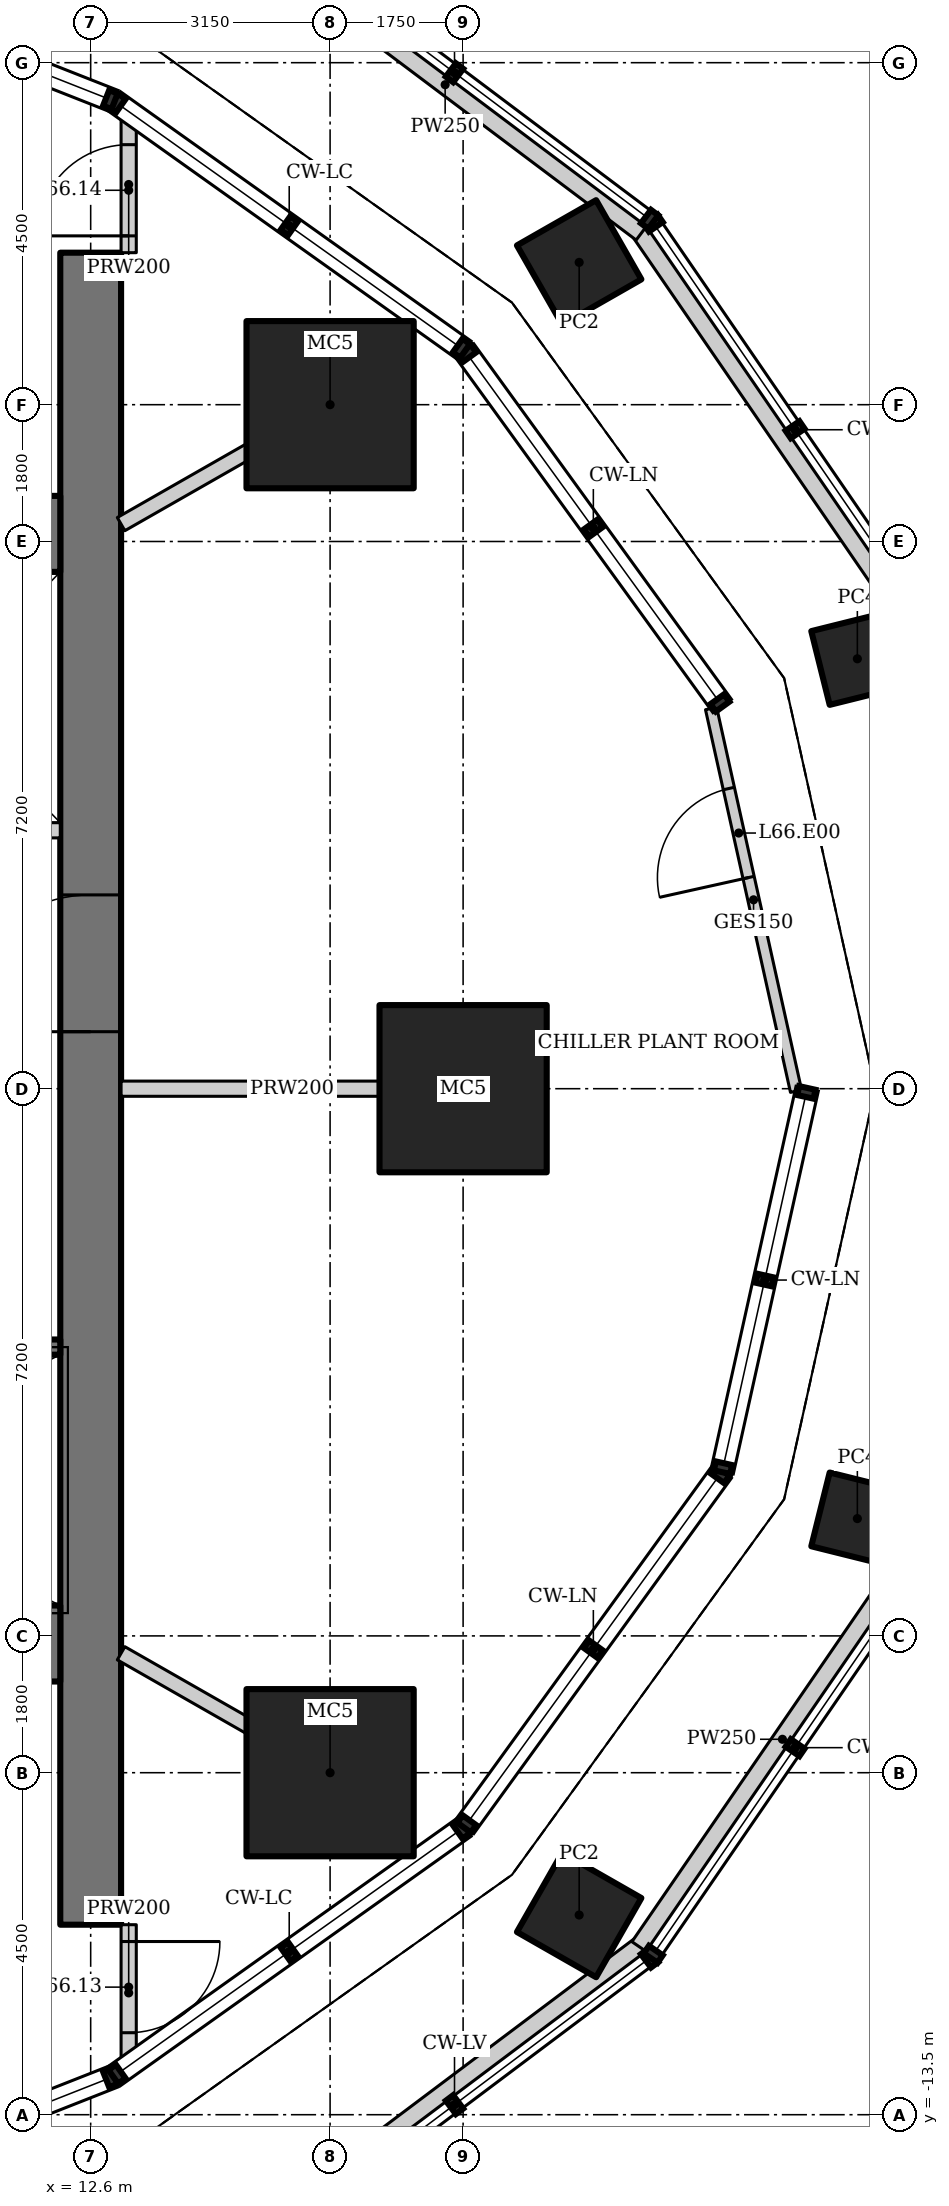
"""IFC4 building model, lengths in metres.
Left out: names, types, materials, properties, quantities, classifications, styles, units other than length and angle.
Written with IfcOpenShell. Run it as: python <this file> out.ifc"""

import sys

from ifc_helpers import new_model, si_unit, direction, frame, frame_2d, origin, origin_2d, place, context, subcontext, project, spatial, rectangle, hollow_rectangle, extrude, element, fill, save


model = new_model("IFC4")
c1 = context("Model", 3, precision=1e-05, world=origin(), true_north=direction((0.0, 1.0)))
c2 = subcontext(c1, "Body", "Model", "MODEL_VIEW")
j1 = project(units=[si_unit("LENGTHUNIT", "METRE"), si_unit("PLANEANGLEUNIT", "RADIAN")], contexts=[c1])
p1 = place(None, origin())
s1 = spatial("IfcSite", under=j1, at=p1, CompositionType="ELEMENT")
p2 = place(p1, origin())
s2 = spatial("IfcBuilding", under=s1, at=p2, CompositionType="ELEMENT")
p3 = place(p2, frame((0.0, 0.0, 284.4)))
s3 = spatial("IfcBuildingStorey", under=s2, at=p3, CompositionType="ELEMENT", Elevation=284.4)
for number, where, z_axis, x_axis in (
    (1, (17.5, 0.0, 0.0), (0.0, 0.0, 1.0), (1.0, 0.0, 0.0)),
    (2, (15.75, 9.0, 0.0), (0.0, 0.0, 1.0), (1.0, 0.0, 0.0)),
    (3, (15.75, -9.0, 0.0), (0.0, 0.0, 1.0), (1.0, 0.0, 0.0)),
):
    element("IfcColumn", number, at=place(p3, frame(where, z_axis=z_axis, x_axis=x_axis)), inside=s3, PredefinedType="COLUMN", context=c2, shape_type="SweptSolid", body=[
        extrude(hollow_rectangle(XDim=2.2, YDim=2.2, WallThickness=0.12, at=origin_2d()), origin(), (0.0, 0.0, 1.0), 5.8),
    ])
p4 = place(p3, frame((22.687, 5.656, 0.0), z_axis=(0.0, 0.0, 1.0), x_axis=(0.970295726276, 0.2419218956, 0.0)))
e4 = element("IfcColumn", 4, at=p4, inside=s3, PredefinedType="COLUMN", context=c2, shape_type="SweptSolid", body=[
    extrude(hollow_rectangle(XDim=1.0, YDim=1.0, WallThickness=0.08, at=origin_2d()), origin(), (0.0, 0.0, 1.0), 6.0),
])
for number, where, z_axis, x_axis in (
    (5, (19.027, 10.873, 0.0), (0.0, 0.0, 1.0), (0.868, 0.496, 0.0)),
    (6, (19.027, -10.873, 0.0), (0.0, 0.0, 1.0), (0.496, 0.868, 0.0)),
):
    element("IfcColumn", number, at=place(p3, frame(where, z_axis=z_axis, x_axis=x_axis)), inside=s3, PredefinedType="COLUMN", context=c2, shape_type="SweptSolid", body=[
        extrude(hollow_rectangle(XDim=1.2, YDim=1.2, WallThickness=0.1, at=origin_2d()), origin(), (0.0, 0.0, 1.0), 6.0),
    ])
p5 = place(p3, frame((22.687, -5.656, 0.0), z_axis=(0.0, 0.0, 1.0), x_axis=(0.2419218956, 0.970295726276, 0.0)))
e7 = element("IfcColumn", 7, at=p5, inside=s3, PredefinedType="COLUMN", context=c2, shape_type="SweptSolid", body=[
    extrude(hollow_rectangle(XDim=1.0, YDim=1.0, WallThickness=0.08, at=origin_2d()), origin(), (0.0, 0.0, 1.0), 6.0),
])
p6 = place(p3, frame((12.6, -11.0, 0.0), z_axis=(0.0, 0.0, 1.0), x_axis=(0.0, 1.0, 0.0)))
e8 = element("IfcWall", 8, at=p6, inside=s3, PredefinedType="SHEAR", context=c2, shape_type="SweptSolid", body=[
    extrude(rectangle(XDim=22.0, YDim=0.8, at=frame_2d((11.0, 0.0))), origin(), (0.0, 0.0, 1.0), 6.0),
])
p7 = place(p6, frame((11.75, 0.0, 0.0)))
e9 = element("IfcOpeningElement", 9, at=p7, cuts=e8, PredefinedType="OPENING", context=c2, shape_type="SweptSolid", body=[
    extrude(rectangle(XDim=1.8, YDim=2.1, at=frame_2d((0.9, 1.05))), frame((0.0, 0.41, 0.0), z_axis=(0.0, -1.0, 0.0), x_axis=(1.0, 0.0, 0.0)), (0.0, 0.0, 1.0), 0.82),
])
p8 = place(p3, frame((-12.2, -7.3, 0.0), z_axis=(0.0, 0.0, 1.0), x_axis=(1.0, 0.0, 0.0)))
e10 = element("IfcWall", 10, at=p8, inside=s3, PredefinedType="SHEAR", context=c2, shape_type="SweptSolid", body=[
    extrude(rectangle(XDim=24.4, YDim=1.0, at=frame_2d((12.2, 0.0))), origin(), (0.0, 0.0, 1.0), 6.0),
])
p9 = place(p3, frame((12.2, 7.3, 0.0), z_axis=(0.0, 0.0, 1.0), x_axis=(-1.0, 0.0, 0.0)))
e11 = element("IfcWall", 11, at=p9, inside=s3, PredefinedType="SHEAR", context=c2, shape_type="SweptSolid", body=[
    extrude(rectangle(XDim=6.6, YDim=1.0, at=frame_2d((3.3, 0.0))), origin(), (0.0, 0.0, 1.0), 6.0),
])
p10 = place(p3, frame((5.6, -3.4, 0.0), z_axis=(0.0, 0.0, 1.0), x_axis=(1.0, 0.0, 0.0)))
e12 = element("IfcWall", 12, at=p10, inside=s3, PredefinedType="SHEAR", context=c2, shape_type="SweptSolid", body=[
    extrude(rectangle(XDim=6.6, YDim=0.2, at=frame_2d((3.3, 0.0))), origin(), (0.0, 0.0, 1.0), 6.0),
])
p11 = place(p10, frame((5.2, 0.0, 0.0)))
e13 = element("IfcOpeningElement", 13, at=p11, cuts=e12, PredefinedType="OPENING", context=c2, shape_type="SweptSolid", body=[
    extrude(rectangle(XDim=1.2, YDim=2.1, at=frame_2d((0.6, 1.05))), frame((0.0, 0.11, 0.0), z_axis=(0.0, -1.0, 0.0), x_axis=(1.0, 0.0, 0.0)), (0.0, 0.0, 1.0), 0.22),
])
p12 = place(p3, frame((12.2, 3.4, 0.0), z_axis=(0.0, 0.0, 1.0), x_axis=(-1.0, 0.0, 0.0)))
e14 = element("IfcWall", 14, at=p12, inside=s3, PredefinedType="SOLIDWALL", context=c2, shape_type="SweptSolid", body=[
    extrude(rectangle(XDim=6.6, YDim=0.2, at=frame_2d((3.3, 0.0))), origin(), (0.0, 0.0, 1.0), 6.0),
])
p13 = place(p12, frame((4.45, 0.0, 0.0)))
e15 = element("IfcOpeningElement", 15, at=p13, cuts=e14, PredefinedType="OPENING", context=c2, shape_type="SweptSolid", body=[
    extrude(rectangle(XDim=1.1, YDim=2.2, at=frame_2d((0.55, 1.1))), frame((0.0, 0.11, 0.0), z_axis=(0.0, -1.0, 0.0), x_axis=(1.0, 0.0, 0.0)), (0.0, 0.0, 1.0), 0.22),
])
p14 = place(p12, frame((0.9, 0.0, 0.0)))
e16 = element("IfcOpeningElement", 16, at=p14, cuts=e14, PredefinedType="OPENING", context=c2, shape_type="SweptSolid", body=[
    extrude(rectangle(XDim=1.4, YDim=2.2, at=frame_2d((0.7, 1.1))), frame((0.0, 0.11, 0.0), z_axis=(0.0, -1.0, 0.0), x_axis=(1.0, 0.0, 0.0)), (0.0, 0.0, 1.0), 0.22),
])
p15 = place(p3, frame((21.88, -0.032, 0.0), z_axis=(0.0, 0.0, 1.0), x_axis=(-0.216770090684, 0.976222683503, 0.0)))
e17 = element("IfcWall", 17, at=p15, inside=s3, PredefinedType="ELEMENTEDWALL", context=c2, shape_type="SweptSolid", body=[
    extrude(rectangle(XDim=5.158, YDim=0.15, at=frame_2d((2.579, 0.0))), origin(), (0.0, 0.0, 1.0), 5.8),
])
p16 = place(p15, frame((2.879, 0.0, 0.0)))
e18 = element("IfcOpeningElement", 18, at=p16, cuts=e17, PredefinedType="OPENING", context=c2, shape_type="SweptSolid", body=[
    extrude(rectangle(XDim=1.2, YDim=2.4, at=frame_2d((0.6, 1.2))), frame((0.0, 0.085, 0.0), z_axis=(0.0, -1.0, 0.0), x_axis=(1.0, 0.0, 0.0)), (0.0, 0.0, 1.0), 0.17),
])
p17 = place(p3, frame((23.578, 5.826, 0.0), z_axis=(0.0, 0.0, 1.0), x_axis=(-0.565946016037, 0.824442300547, 0.0)))
e19 = element("IfcWall", 19, at=p17, inside=s3, PredefinedType="PARAPET", context=c2, shape_type="SweptSolid", body=[
    extrude(rectangle(XDim=6.633, YDim=0.25, at=frame_2d((3.316, 0.0))), origin(), (0.0, 0.0, 1.0), 1.1),
])
for number, where, z_axis, x_axis in (
    (20, (19.852, 11.266, 0.0), (0.0, 0.0, 1.0), (-0.8, 0.601, 0.0)),
    (21, (14.676, -15.154, 0.0), (0.0, 0.0, 1.0), (0.8, 0.601, 0.0)),
):
    element("IfcWall", number, at=place(p3, frame(where, z_axis=z_axis, x_axis=x_axis)), inside=s3, PredefinedType="PARAPET", context=c2, shape_type="SweptSolid", body=[
        extrude(rectangle(XDim=6.474, YDim=0.25, at=frame_2d((3.237, 0.0))), origin(), (0.0, 0.0, 1.0), 1.1),
    ])
p18 = place(p3, frame((19.824, -11.294, 0.0), z_axis=(0.0, 0.0, 1.0), x_axis=(0.565946016037, 0.824442300547, 0.0)))
e22 = element("IfcWall", 22, at=p18, inside=s3, PredefinedType="PARAPET", context=c2, shape_type="SweptSolid", body=[
    extrude(rectangle(XDim=6.633, YDim=0.25, at=frame_2d((3.316, 0.0))), origin(), (0.0, 0.0, 1.0), 1.1),
])
p19 = place(p3, frame((13.1, -11.0, 0.0), z_axis=(0.0, 0.0, 1.0), x_axis=(0.0, -1.0, 0.0)))
e23 = element("IfcWall", 23, at=p19, inside=s3, PredefinedType="SOLIDWALL", context=c2, shape_type="SweptSolid", body=[
    extrude(rectangle(XDim=1.794, YDim=0.2, at=frame_2d((0.897, 0.0))), origin(), (0.0, 0.0, 1.0), 5.8),
])
p20 = place(p19, frame((0.221, 0.0, 0.0)))
e24 = element("IfcOpeningElement", 24, at=p20, cuts=e23, PredefinedType="OPENING", context=c2, shape_type="SweptSolid", body=[
    extrude(rectangle(XDim=1.2, YDim=2.1, at=frame_2d((0.6, 1.05))), frame((0.0, 0.11, 0.0), z_axis=(0.0, -1.0, 0.0), x_axis=(1.0, 0.0, 0.0)), (0.0, 0.0, 1.0), 0.22),
])
p21 = place(p3, frame((13.1, 11.0, 0.0), z_axis=(0.0, 0.0, 1.0), x_axis=(0.0, 1.0, 0.0)))
e25 = element("IfcWall", 25, at=p21, inside=s3, PredefinedType="SOLIDWALL", context=c2, shape_type="SweptSolid", body=[
    extrude(rectangle(XDim=1.794, YDim=0.2, at=frame_2d((0.897, 0.0))), origin(), (0.0, 0.0, 1.0), 5.8),
])
p22 = place(p21, frame((0.221, 0.0, 0.0)))
e26 = element("IfcOpeningElement", 26, at=p22, cuts=e25, PredefinedType="OPENING", context=c2, shape_type="SweptSolid", body=[
    extrude(rectangle(XDim=1.2, YDim=2.1, at=frame_2d((0.6, 1.05))), frame((0.0, 0.11, 0.0), z_axis=(0.0, -1.0, 0.0), x_axis=(1.0, 0.0, 0.0)), (0.0, 0.0, 1.0), 0.22),
])
p23 = place(p3, frame((13.0, 0.0, 0.0), z_axis=(0.0, 0.0, 1.0), x_axis=(1.0, 0.0, 0.0)))
e27 = element("IfcWall", 27, at=p23, inside=s3, PredefinedType="SOLIDWALL", context=c2, shape_type="SweptSolid", body=[
    extrude(rectangle(XDim=4.5, YDim=0.2, at=frame_2d((2.25, 0.0))), origin(), (0.0, 0.0, 1.0), 4.6),
])
for number, where, z_axis, x_axis in (
    (28, (13.0, 7.428, 0.0), (0.0, 0.0, 1.0), (0.868, 0.496, 0.0)),
    (29, (13.0, -7.428, 0.0), (0.0, 0.0, 1.0), (0.868, -0.496, 0.0)),
):
    element("IfcWall", number, at=place(p3, frame(where, z_axis=z_axis, x_axis=x_axis)), inside=s3, PredefinedType="SOLIDWALL", context=c2, shape_type="SweptSolid", body=[
        extrude(rectangle(XDim=3.167, YDim=0.2, at=frame_2d((1.584, 0.0))), origin(), (0.0, 0.0, 1.0), 4.6),
    ])
p24 = place(p16, origin())
e30 = element("IfcDoor", 30, at=p24, inside=s3, OperationType="DOUBLE_DOOR_DOUBLE_SWING", PredefinedType="DOOR", context=c2, shape_type="SweptSolid", body=[
    extrude(rectangle(XDim=1.2, YDim=2.4, at=frame_2d((0.6, 1.2))), frame((0.0, 0.025, 0.0), z_axis=(0.0, -1.0, 0.0), x_axis=(1.0, 0.0, 0.0)), (0.0, 0.0, 1.0), 0.05),
])
fill(e18, e30)
p25 = place(p7, origin())
e31 = element("IfcDoor", 31, at=p25, inside=s3, OperationType="DOUBLE_DOOR_DOUBLE_SWING", PredefinedType="DOOR", context=c2, shape_type="SweptSolid", body=[
    extrude(rectangle(XDim=1.8, YDim=2.1, at=frame_2d((0.9, 1.05))), frame((0.0, 0.025, 0.0), z_axis=(0.0, -1.0, 0.0), x_axis=(1.0, 0.0, 0.0)), (0.0, 0.0, 1.0), 0.05),
])
fill(e9, e31)
p26 = place(p20, origin())
e32 = element("IfcDoor", 32, at=p26, inside=s3, OperationType="SINGLE_SWING_LEFT", PredefinedType="DOOR", context=c2, shape_type="SweptSolid", body=[
    extrude(rectangle(XDim=1.2, YDim=2.1, at=frame_2d((0.6, 1.05))), frame((0.0, 0.025, 0.0), z_axis=(0.0, -1.0, 0.0), x_axis=(1.0, 0.0, 0.0)), (0.0, 0.0, 1.0), 0.05),
])
fill(e24, e32)
p27 = place(p22, origin())
e33 = element("IfcDoor", 33, at=p27, inside=s3, OperationType="SINGLE_SWING_LEFT", PredefinedType="DOOR", context=c2, shape_type="SweptSolid", body=[
    extrude(rectangle(XDim=1.2, YDim=2.1, at=frame_2d((0.6, 1.05))), frame((0.0, 0.025, 0.0), z_axis=(0.0, -1.0, 0.0), x_axis=(1.0, 0.0, 0.0)), (0.0, 0.0, 1.0), 0.05),
])
fill(e26, e33)
save(model, sys.argv[1])
